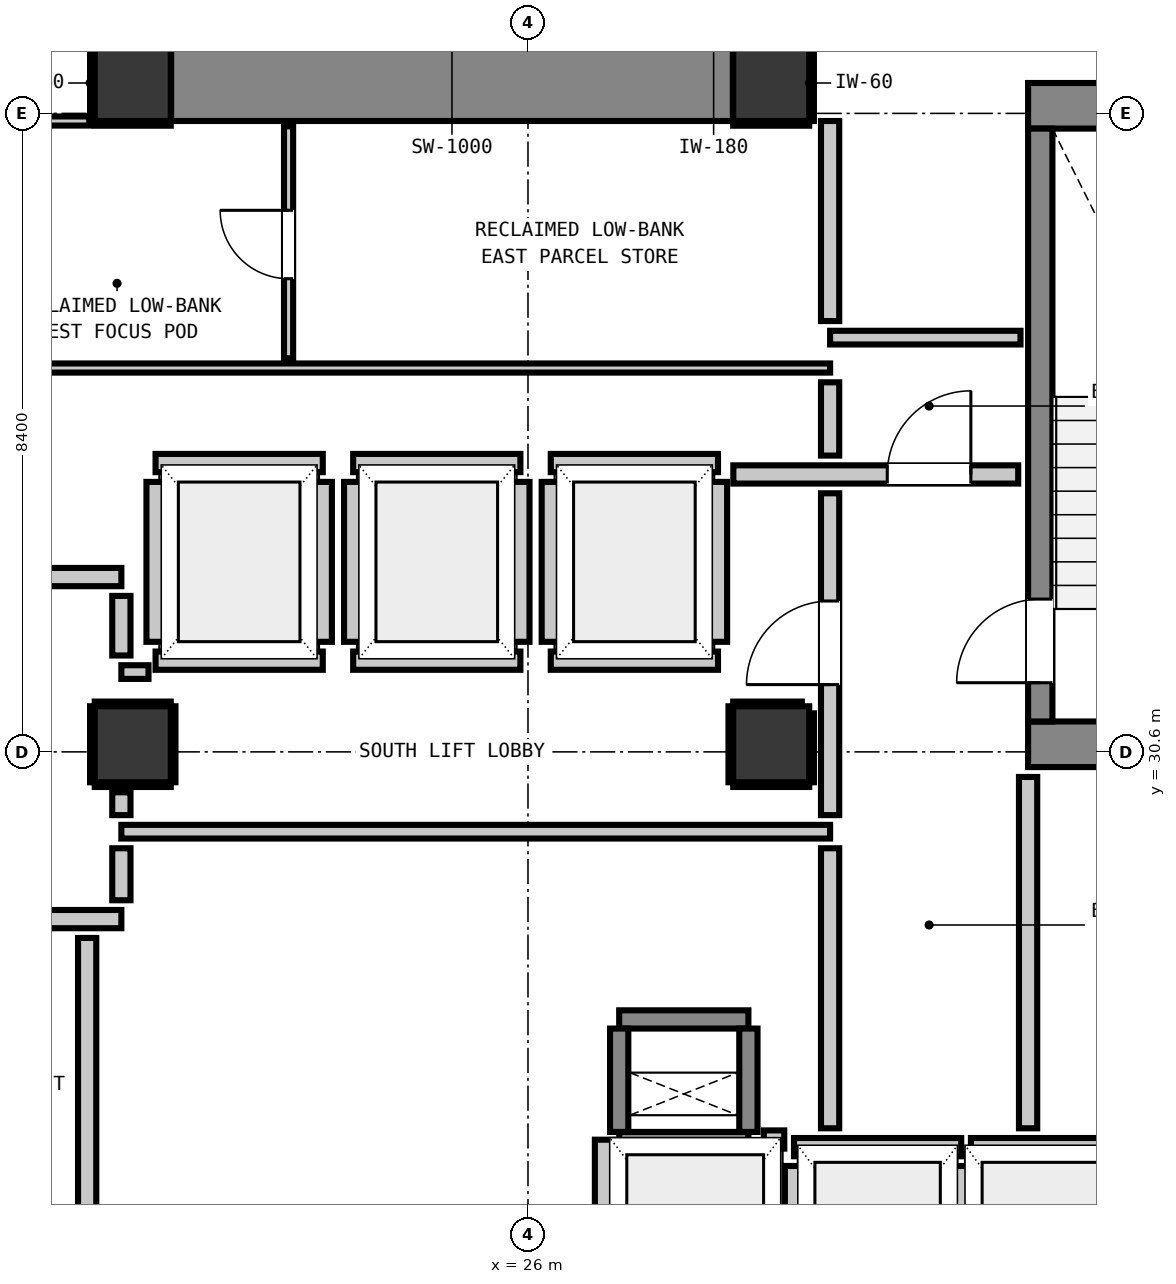
"""IFC4 building model, lengths in metres.
Left out: names, types, materials, properties, quantities, classifications, styles, units other than length and angle.
Written with IfcOpenShell. Run it as: python <this file> out.ifc"""

import sys

from ifc_helpers import new_model, si_unit, direction, frame, frame_2d, origin, origin_2d, place, context, subcontext, project, spatial, rectangle, extrude, element, fill, save


model = new_model("IFC4")
c1 = context("Model", 3, precision=1e-05, world=origin(), true_north=direction((0.0, 1.0)))
c2 = subcontext(c1, "Body", "Model", "MODEL_VIEW")
j1 = project(units=[si_unit("LENGTHUNIT", "METRE"), si_unit("PLANEANGLEUNIT", "RADIAN")], contexts=[c1])
p1 = place(None, origin())
s1 = spatial("IfcSite", under=j1, at=p1, CompositionType="ELEMENT")
p2 = place(p1, origin())
s2 = spatial("IfcBuilding", under=s1, at=p2, CompositionType="ELEMENT")
p3 = place(p2, frame((0.0, 0.0, 142.6)))
s3 = spatial("IfcBuildingStorey", under=s2, at=p3, CompositionType="ELEMENT", Elevation=142.6)
for number, where, z_axis, x_axis in (
    (1, (20.8, 39.4, 0.0), (0.0, 0.0, 1.0), (1.0, 0.0, 0.0)),
    (2, (29.2, 39.4, 0.0), (0.0, 0.0, 1.0), (1.0, 0.0, 0.0)),
):
    element("IfcColumn", number, at=place(p3, frame(where, z_axis=z_axis, x_axis=x_axis)), inside=s3, PredefinedType="COLUMN", context=c2, shape_type="SweptSolid", body=[
        extrude(rectangle(XDim=1.0, YDim=1.0, at=origin_2d()), origin(), (0.0, 0.0, 1.0), 3.32),
    ])
p4 = place(p3, frame((32.58, 39.1, 0.0), z_axis=(0.0, 0.0, 1.0), x_axis=(1.0, 0.0, 0.0)))
e3 = element("IfcWall", 3, at=p4, inside=s3, PredefinedType="SHEAR", context=c2, shape_type="SweptSolid", body=[
    extrude(rectangle(XDim=4.08, YDim=0.6, at=frame_2d((2.04, 0.0))), origin(), (0.0, 0.0, 1.0), 3.32),
])
p5 = place(p3, frame((32.58, 30.7, 0.0), z_axis=(0.0, 0.0, 1.0), x_axis=(1.0, 0.0, 0.0)))
e4 = element("IfcWall", 4, at=p5, inside=s3, PredefinedType="SHEAR", context=c2, shape_type="SweptSolid", body=[
    extrude(rectangle(XDim=3.415, YDim=0.6, at=frame_2d((1.708, 0.0))), origin(), (0.0, 0.0, 1.0), 3.32),
])
p6 = place(p3, frame((21.305, 39.4, 0.0), z_axis=(0.0, 0.0, 1.0), x_axis=(1.0, 0.0, 0.0)))
e5 = element("IfcWall", 5, at=p6, inside=s3, PredefinedType="SHEAR", context=c2, shape_type="SweptSolid", body=[
    extrude(rectangle(XDim=7.39, YDim=1.0, at=frame_2d((3.695, 0.0))), origin(), (0.0, 0.0, 1.0), 3.32),
])
p7 = place(p3, frame((32.74, 31.0, 0.0), z_axis=(0.0, 0.0, 1.0), x_axis=(0.0, 1.0, 0.0)))
e6 = element("IfcWall", 6, at=p7, inside=s3, PredefinedType="SHEAR", context=c2, shape_type="SweptSolid", body=[
    extrude(rectangle(XDim=7.8, YDim=0.32, at=frame_2d((3.9, 0.0))), origin(), (0.0, 0.0, 1.0), 3.32),
])
p8 = place(p7, frame((0.51, 0.0, 0.0)))
e7 = element("IfcOpeningElement", 7, at=p8, cuts=e6, PredefinedType="OPENING", context=c2, shape_type="SweptSolid", body=[
    extrude(rectangle(XDim=1.1, YDim=2.15, at=frame_2d((0.55, 1.075))), frame((0.0, 0.17, 0.0), z_axis=(0.0, -1.0, 0.0), x_axis=(1.0, 0.0, 0.0)), (0.0, 0.0, 1.0), 0.34),
])
for number, where, z_axis, x_axis in (
    (8, (27.2, 25.48, 0.0), (0.0, 0.0, 1.0), (1.0, 0.0, 0.0)),
    (9, (27.2, 27.08, 0.0), (0.0, 0.0, 1.0), (1.0, 0.0, 0.0)),
):
    element("IfcWall", number, at=place(p3, frame(where, z_axis=z_axis, x_axis=x_axis)), inside=s3, PredefinedType="SHEAR", context=c2, shape_type="SweptSolid", body=[
        extrude(rectangle(XDim=1.7, YDim=0.24, at=frame_2d((0.85, 0.0))), origin(), (0.0, 0.0, 1.0), 3.32),
    ])
for number, where, z_axis, x_axis in (
    (10, (27.2, 25.6, 0.0), (0.0, 0.0, 1.0), (0.0, 1.0, 0.0)),
    (11, (28.9, 25.6, 0.0), (0.0, 0.0, 1.0), (0.0, 1.0, 0.0)),
):
    element("IfcWall", number, at=place(p3, frame(where, z_axis=z_axis, x_axis=x_axis)), inside=s3, PredefinedType="SHEAR", context=c2, shape_type="SweptSolid", body=[
        extrude(rectangle(XDim=1.36, YDim=0.24, at=frame_2d((0.68, 0.0))), origin(), (0.0, 0.0, 1.0), 3.32),
    ])
for number, where, z_axis, x_axis in (
    (12, (20.8, 30.7, 0.0), (0.0, 0.0, 1.0), (1.0, 0.0, 0.0)),
    (13, (29.2, 30.7, 0.0), (0.0, 0.0, 1.0), (1.0, 0.0, 0.0)),
):
    element("IfcColumn", number, at=place(p3, frame(where, z_axis=z_axis, x_axis=x_axis)), inside=s3, PredefinedType="COLUMN", context=c2, shape_type="SweptSolid", body=[
        extrude(rectangle(XDim=1.0, YDim=1.0, at=origin_2d()), origin(), (0.0, 0.0, 1.0), 3.32),
    ])
for number, where, z_axis, x_axis in (
    (14, (21.1, 31.8, 0.0), (0.0, 0.0, 1.0), (1.0, 0.0, 0.0)),
    (15, (21.1, 34.4, 0.0), (0.0, 0.0, 1.0), (1.0, 0.0, 0.0)),
):
    element("IfcWall", number, at=place(p3, frame(where, z_axis=z_axis, x_axis=x_axis)), inside=s3, PredefinedType="PARTITIONING", context=c2, shape_type="SweptSolid", body=[
        extrude(rectangle(XDim=2.2, YDim=0.24, at=frame_2d((1.1, 0.0))), origin(), (0.0, 0.0, 1.0), 2.9),
    ])
p9 = place(p3, frame((21.1, 32.048, 0.0), z_axis=(0.0, 0.0, 1.0), x_axis=(0.0, 1.0, 0.0)))
e16 = element("IfcWall", 16, at=p9, inside=s3, PredefinedType="PARTITIONING", context=c2, shape_type="SweptSolid", body=[
    extrude(rectangle(XDim=2.104, YDim=0.24, at=frame_2d((1.052, 0.0))), origin(), (0.0, 0.0, 1.0), 0.905),
])
p10 = place(p3, frame((23.3, 32.048, 0.0), z_axis=(0.0, 0.0, 1.0), x_axis=(0.0, 1.0, 0.0)))
e17 = element("IfcWall", 17, at=p10, inside=s3, PredefinedType="PARTITIONING", context=c2, shape_type="SweptSolid", body=[
    extrude(rectangle(XDim=2.104, YDim=0.24, at=frame_2d((1.052, 0.0))), origin(), (0.0, 0.0, 1.0), 2.9),
])
for number, where, z_axis, x_axis in (
    (18, (23.7, 31.8, 0.0), (0.0, 0.0, 1.0), (1.0, 0.0, 0.0)),
    (19, (23.7, 34.4, 0.0), (0.0, 0.0, 1.0), (1.0, 0.0, 0.0)),
):
    element("IfcWall", number, at=place(p3, frame(where, z_axis=z_axis, x_axis=x_axis)), inside=s3, PredefinedType="PARTITIONING", context=c2, shape_type="SweptSolid", body=[
        extrude(rectangle(XDim=2.2, YDim=0.24, at=frame_2d((1.1, 0.0))), origin(), (0.0, 0.0, 1.0), 2.9),
    ])
for number, where, z_axis, x_axis in (
    (20, (23.7, 32.048, 0.0), (0.0, 0.0, 1.0), (0.0, 1.0, 0.0)),
    (21, (25.9, 32.048, 0.0), (0.0, 0.0, 1.0), (0.0, 1.0, 0.0)),
):
    element("IfcWall", number, at=place(p3, frame(where, z_axis=z_axis, x_axis=x_axis)), inside=s3, PredefinedType="PARTITIONING", context=c2, shape_type="SweptSolid", body=[
        extrude(rectangle(XDim=2.104, YDim=0.24, at=frame_2d((1.052, 0.0))), origin(), (0.0, 0.0, 1.0), 2.9),
    ])
for number, where, z_axis, x_axis in (
    (22, (26.3, 31.8, 0.0), (0.0, 0.0, 1.0), (1.0, 0.0, 0.0)),
    (23, (26.3, 34.4, 0.0), (0.0, 0.0, 1.0), (1.0, 0.0, 0.0)),
):
    element("IfcWall", number, at=place(p3, frame(where, z_axis=z_axis, x_axis=x_axis)), inside=s3, PredefinedType="PARTITIONING", context=c2, shape_type="SweptSolid", body=[
        extrude(rectangle(XDim=2.2, YDim=0.24, at=frame_2d((1.1, 0.0))), origin(), (0.0, 0.0, 1.0), 2.9),
    ])
p11 = place(p3, frame((26.3, 32.048, 0.0), z_axis=(0.0, 0.0, 1.0), x_axis=(0.0, 1.0, 0.0)))
e24 = element("IfcWall", 24, at=p11, inside=s3, PredefinedType="PARTITIONING", context=c2, shape_type="SweptSolid", body=[
    extrude(rectangle(XDim=2.104, YDim=0.24, at=frame_2d((1.052, 0.0))), origin(), (0.0, 0.0, 1.0), 2.9),
])
p12 = place(p3, frame((28.5, 32.048, 0.0), z_axis=(0.0, 0.0, 1.0), x_axis=(0.0, 1.0, 0.0)))
e25 = element("IfcWall", 25, at=p12, inside=s3, PredefinedType="PARTITIONING", context=c2, shape_type="SweptSolid", body=[
    extrude(rectangle(XDim=2.104, YDim=0.24, at=frame_2d((1.052, 0.0))), origin(), (0.0, 0.0, 1.0), 0.905),
])
p13 = place(p3, frame((29.5, 25.4, 0.0), z_axis=(0.0, 0.0, 1.0), x_axis=(1.0, 0.0, 0.0)))
e26 = element("IfcWall", 26, at=p13, inside=s3, PredefinedType="PARTITIONING", context=c2, shape_type="SweptSolid", body=[
    extrude(rectangle(XDim=2.2, YDim=0.24, at=frame_2d((1.1, 0.0))), origin(), (0.0, 0.0, 1.0), 2.9),
])
p14 = place(p3, frame((29.5, 22.632, 0.0), z_axis=(0.0, 0.0, 1.0), x_axis=(0.0, 1.0, 0.0)))
e27 = element("IfcWall", 27, at=p14, inside=s3, PredefinedType="PARTITIONING", context=c2, shape_type="SweptSolid", body=[
    extrude(rectangle(XDim=2.52, YDim=0.24, at=frame_2d((1.26, 0.0))), origin(), (0.0, 0.0, 1.0), 0.905),
])
p15 = place(p3, frame((31.7, 22.63, 0.0), z_axis=(0.0, 0.0, 1.0), x_axis=(0.0, 1.0, 0.0)))
e28 = element("IfcWall", 28, at=p15, inside=s3, PredefinedType="PARTITIONING", context=c2, shape_type="SweptSolid", body=[
    extrude(rectangle(XDim=2.522, YDim=0.24, at=frame_2d((1.261, 0.0))), origin(), (0.0, 0.0, 1.0), 2.9),
])
p16 = place(p3, frame((31.828, 25.4, 0.0), z_axis=(0.0, 0.0, 1.0), x_axis=(1.0, 0.0, 0.0)))
e29 = element("IfcWall", 29, at=p16, inside=s3, PredefinedType="PARTITIONING", context=c2, shape_type="SweptSolid", body=[
    extrude(rectangle(XDim=2.072, YDim=0.24, at=frame_2d((1.036, 0.0))), origin(), (0.0, 0.0, 1.0), 2.9),
])
p17 = place(p3, frame((29.103, 25.5, 0.0), z_axis=(0.0, 0.0, 1.0), x_axis=(1.0, 0.0, 0.0)))
e30 = element("IfcWall", 30, at=p17, inside=s3, PredefinedType="PARTITIONING", context=c2, shape_type="SweptSolid", body=[
    extrude(rectangle(XDim=0.269, YDim=0.24, at=frame_2d((0.135, 0.0))), origin(), (0.0, 0.0, 1.0), 2.9),
])
p18 = place(p3, frame((27.0, 22.63, 0.0), z_axis=(0.0, 0.0, 1.0), x_axis=(0.0, 1.0, 0.0)))
e31 = element("IfcWall", 31, at=p18, inside=s3, PredefinedType="PARTITIONING", context=c2, shape_type="SweptSolid", body=[
    extrude(rectangle(XDim=2.868, YDim=0.24, at=frame_2d((1.434, 0.0))), origin(), (0.0, 0.0, 1.0), 2.9),
])
p19 = place(p3, frame((17.45, 28.4, 0.0), z_axis=(0.0, 0.0, 1.0), x_axis=(1.0, 0.0, 0.0)))
e32 = element("IfcWall", 32, at=p19, inside=s3, PredefinedType="PARTITIONING", context=c2, shape_type="SweptSolid", body=[
    extrude(rectangle(XDim=3.2, YDim=0.24, at=frame_2d((1.6, 0.0))), origin(), (0.0, 0.0, 1.0), 2.9),
])
p20 = place(p19, frame((0.784, 0.0, 0.0)))
e33 = element("IfcOpeningElement", 33, at=p20, cuts=e32, PredefinedType="OPENING", context=c2, shape_type="SweptSolid", body=[
    extrude(rectangle(XDim=1.1, YDim=2.15, at=frame_2d((0.55, 1.075))), frame((0.0, 0.13, 0.0), z_axis=(0.0, -1.0, 0.0), x_axis=(1.0, 0.0, 0.0)), (0.0, 0.0, 1.0), 0.26),
])
p21 = place(p3, frame((17.45, 32.9, 0.0), z_axis=(0.0, 0.0, 1.0), x_axis=(1.0, 0.0, 0.0)))
e34 = element("IfcWall", 34, at=p21, inside=s3, PredefinedType="PARTITIONING", context=c2, shape_type="SweptSolid", body=[
    extrude(rectangle(XDim=3.2, YDim=0.24, at=frame_2d((1.6, 0.0))), origin(), (0.0, 0.0, 1.0), 2.9),
])
p22 = place(p21, frame((0.159, 0.0, 0.0)))
e35 = element("IfcOpeningElement", 35, at=p22, cuts=e34, PredefinedType="OPENING", context=c2, shape_type="SweptSolid", body=[
    extrude(rectangle(XDim=1.1, YDim=2.15, at=frame_2d((0.55, 1.075))), frame((0.0, 0.13, 0.0), z_axis=(0.0, -1.0, 0.0), x_axis=(1.0, 0.0, 0.0)), (0.0, 0.0, 1.0), 0.26),
])
p23 = place(p3, frame((28.702, 34.25, 0.0), z_axis=(0.0, 0.0, 1.0), x_axis=(1.0, 0.0, 0.0)))
e36 = element("IfcWall", 36, at=p23, inside=s3, PredefinedType="PARTITIONING", context=c2, shape_type="SweptSolid", body=[
    extrude(rectangle(XDim=3.748, YDim=0.24, at=frame_2d((1.874, 0.0))), origin(), (0.0, 0.0, 1.0), 2.9),
])
p24 = place(p23, frame((2.025, 0.0, 0.0)))
e37 = element("IfcOpeningElement", 37, at=p24, cuts=e36, PredefinedType="OPENING", context=c2, shape_type="SweptSolid", body=[
    extrude(rectangle(XDim=1.1, YDim=2.15, at=frame_2d((0.55, 1.075))), frame((0.0, 0.13, 0.0), z_axis=(0.0, -1.0, 0.0), x_axis=(1.0, 0.0, 0.0)), (0.0, 0.0, 1.0), 0.26),
])
p25 = place(p3, frame((20.65, 29.55, 0.0), z_axis=(0.0, 0.0, 1.0), x_axis=(1.0, 0.0, 0.0)))
e38 = element("IfcWall", 38, at=p25, inside=s3, PredefinedType="PARTITIONING", context=c2, shape_type="SweptSolid", body=[
    extrude(rectangle(XDim=9.325, YDim=0.18, at=frame_2d((4.663, 0.0))), origin(), (0.0, 0.0, 1.0), 2.9),
])
p26 = place(p3, frame((20.65, 31.65, 0.0), z_axis=(0.0, 0.0, 1.0), x_axis=(1.0, 0.0, 0.0)))
e39 = element("IfcWall", 39, at=p26, inside=s3, PredefinedType="PARTITIONING", context=c2, shape_type="SweptSolid", body=[
    extrude(rectangle(XDim=0.357, YDim=0.18, at=frame_2d((0.179, 0.0))), origin(), (0.0, 0.0, 1.0), 2.9),
])
p27 = place(p3, frame((29.975, 36.05, 0.0), z_axis=(0.0, 0.0, 1.0), x_axis=(1.0, 0.0, 0.0)))
e40 = element("IfcWall", 40, at=p27, inside=s3, PredefinedType="PARTITIONING", context=c2, shape_type="SweptSolid", body=[
    extrude(rectangle(XDim=2.505, YDim=0.18, at=frame_2d((1.252, 0.0))), origin(), (0.0, 0.0, 1.0), 2.9),
])
p28 = place(p3, frame((18.95, 35.65, 0.0), z_axis=(0.0, 0.0, 1.0), x_axis=(1.0, 0.0, 0.0)))
e41 = element("IfcWall", 41, at=p28, inside=s3, PredefinedType="PARTITIONING", context=c2, shape_type="SweptSolid", body=[
    extrude(rectangle(XDim=11.025, YDim=0.12, at=frame_2d((5.513, 0.0))), origin(), (0.0, 0.0, 1.0), 2.9),
])
p29 = place(p3, frame((18.95, 38.9, 0.0), z_axis=(0.0, 0.0, 1.0), x_axis=(1.0, 0.0, 0.0)))
e42 = element("IfcWall", 42, at=p29, inside=s3, PredefinedType="PARTITIONING", context=c2, shape_type="SweptSolid", body=[
    extrude(rectangle(XDim=1.278, YDim=0.12, at=frame_2d((0.639, 0.0))), origin(), (0.0, 0.0, 1.0), 0.905),
])
p30 = place(p3, frame((20.2, 22.586, 0.0), z_axis=(0.0, 0.0, 1.0), x_axis=(0.0, 1.0, 0.0)))
e43 = element("IfcWall", 43, at=p30, inside=s3, PredefinedType="PARTITIONING", context=c2, shape_type="SweptSolid", body=[
    extrude(rectangle(XDim=5.566, YDim=0.24, at=frame_2d((2.783, 0.0))), origin(), (0.0, 0.0, 1.0), 0.905),
])
p31 = place(p3, frame((20.65, 28.648, 0.0), z_axis=(0.0, 0.0, 1.0), x_axis=(0.0, 1.0, 0.0)))
e44 = element("IfcWall", 44, at=p31, inside=s3, PredefinedType="PARTITIONING", context=c2, shape_type="SweptSolid", body=[
    extrude(rectangle(XDim=0.684, YDim=0.24, at=frame_2d((0.342, 0.0))), origin(), (0.0, 0.0, 1.0), 0.905),
])
p32 = place(p3, frame((20.65, 29.768, 0.0), z_axis=(0.0, 0.0, 1.0), x_axis=(0.0, 1.0, 0.0)))
e45 = element("IfcWall", 45, at=p32, inside=s3, PredefinedType="PARTITIONING", context=c2, shape_type="SweptSolid", body=[
    extrude(rectangle(XDim=0.3, YDim=0.24, at=frame_2d((0.15, 0.0))), origin(), (0.0, 0.0, 1.0), 0.905),
])
p33 = place(p3, frame((20.65, 31.868, 0.0), z_axis=(0.0, 0.0, 1.0), x_axis=(0.0, 1.0, 0.0)))
e46 = element("IfcWall", 46, at=p33, inside=s3, PredefinedType="PARTITIONING", context=c2, shape_type="SweptSolid", body=[
    extrude(rectangle(XDim=0.784, YDim=0.24, at=frame_2d((0.392, 0.0))), origin(), (0.0, 0.0, 1.0), 0.905),
])
p34 = place(p3, frame((29.975, 25.648, 0.0), z_axis=(0.0, 0.0, 1.0), x_axis=(0.0, 1.0, 0.0)))
e47 = element("IfcWall", 47, at=p34, inside=s3, PredefinedType="PARTITIONING", context=c2, shape_type="SweptSolid", body=[
    extrude(rectangle(XDim=3.684, YDim=0.24, at=frame_2d((1.842, 0.0))), origin(), (0.0, 0.0, 1.0), 2.9),
])
p35 = place(p3, frame((29.975, 29.768, 0.0), z_axis=(0.0, 0.0, 1.0), x_axis=(0.0, 1.0, 0.0)))
e48 = element("IfcWall", 48, at=p35, inside=s3, PredefinedType="PARTITIONING", context=c2, shape_type="SweptSolid", body=[
    extrude(rectangle(XDim=4.234, YDim=0.24, at=frame_2d((2.117, 0.0))), origin(), (0.0, 0.0, 1.0), 2.9),
])
p36 = place(p35, frame((1.717, 0.0, 0.0)))
e49 = element("IfcOpeningElement", 49, at=p36, cuts=e48, PredefinedType="OPENING", context=c2, shape_type="SweptSolid", body=[
    extrude(rectangle(XDim=1.1, YDim=2.15, at=frame_2d((0.55, 1.075))), frame((0.0, 0.13, 0.0), z_axis=(0.0, -1.0, 0.0), x_axis=(1.0, 0.0, 0.0)), (0.0, 0.0, 1.0), 0.26),
])
p37 = place(p3, frame((29.975, 34.498, 0.0), z_axis=(0.0, 0.0, 1.0), x_axis=(0.0, 1.0, 0.0)))
e50 = element("IfcWall", 50, at=p37, inside=s3, PredefinedType="PARTITIONING", context=c2, shape_type="SweptSolid", body=[
    extrude(rectangle(XDim=0.964, YDim=0.24, at=frame_2d((0.482, 0.0))), origin(), (0.0, 0.0, 1.0), 2.9),
])
p38 = place(p3, frame((29.975, 36.268, 0.0), z_axis=(0.0, 0.0, 1.0), x_axis=(0.0, 1.0, 0.0)))
e51 = element("IfcWall", 51, at=p38, inside=s3, PredefinedType="PARTITIONING", context=c2, shape_type="SweptSolid", body=[
    extrude(rectangle(XDim=2.632, YDim=0.24, at=frame_2d((1.316, 0.0))), origin(), (0.0, 0.0, 1.0), 2.9),
])
p39 = place(p3, frame((32.58, 25.648, 0.0), z_axis=(0.0, 0.0, 1.0), x_axis=(0.0, 1.0, 0.0)))
e52 = element("IfcWall", 52, at=p39, inside=s3, PredefinedType="PARTITIONING", context=c2, shape_type="SweptSolid", body=[
    extrude(rectangle(XDim=4.622, YDim=0.24, at=frame_2d((2.311, 0.0))), origin(), (0.0, 0.0, 1.0), 2.9),
])
p40 = place(p3, frame((22.85, 35.778, 0.0), z_axis=(0.0, 0.0, 1.0), x_axis=(0.0, 1.0, 0.0)))
e53 = element("IfcWall", 53, at=p40, inside=s3, PredefinedType="PARTITIONING", context=c2, shape_type="SweptSolid", body=[
    extrude(rectangle(XDim=3.052, YDim=0.12, at=frame_2d((1.526, 0.0))), origin(), (0.0, 0.0, 1.0), 2.9),
])
p41 = place(p40, frame((1.047, 0.0, 0.0)))
e54 = element("IfcOpeningElement", 54, at=p41, cuts=e53, PredefinedType="OPENING", context=c2, shape_type="SweptSolid", body=[
    extrude(rectangle(XDim=0.9, YDim=2.1, at=frame_2d((0.45, 1.05))), frame((0.0, 0.07, 0.0), z_axis=(0.0, -1.0, 0.0), x_axis=(1.0, 0.0, 0.0)), (0.0, 0.0, 1.0), 0.14),
])
for number, where, z_axis, x_axis in (
    (55, (20.3, 38.868, 0.0), (0.0, 0.0, 1.0), (1.0, 0.0, 0.0)),
    (56, (20.268, 38.9, 0.0), (0.0, 0.0, 1.0), (0.0, 1.0, 0.0)),
    (57, (28.7, 38.868, 0.0), (0.0, 0.0, 1.0), (1.0, 0.0, 0.0)),
    (58, (29.732, 38.9, 0.0), (0.0, 0.0, 1.0), (0.0, 1.0, 0.0)),
    (59, (20.3, 30.168, 0.0), (0.0, 0.0, 1.0), (1.0, 0.0, 0.0)),
    (60, (20.3, 31.232, 0.0), (0.0, 0.0, 1.0), (1.0, 0.0, 0.0)),
    (61, (20.268, 30.2, 0.0), (0.0, 0.0, 1.0), (0.0, 1.0, 0.0)),
    (62, (21.332, 30.2, 0.0), (0.0, 0.0, 1.0), (0.0, 1.0, 0.0)),
    (63, (28.7, 30.168, 0.0), (0.0, 0.0, 1.0), (1.0, 0.0, 0.0)),
):
    element("IfcWall", number, at=place(p3, frame(where, z_axis=z_axis, x_axis=x_axis)), inside=s3, PredefinedType="PARTITIONING", context=c2, shape_type="SweptSolid", body=[
        extrude(rectangle(XDim=1.0, YDim=0.06, at=frame_2d((0.5, 0.0))), origin(), (0.0, 0.0, 1.0), 0.905),
    ])
p42 = place(p3, frame((28.7, 31.232, 0.0), z_axis=(0.0, 0.0, 1.0), x_axis=(1.0, 0.0, 0.0)))
e64 = element("IfcWall", 64, at=p42, inside=s3, PredefinedType="PARTITIONING", context=c2, shape_type="SweptSolid", body=[
    extrude(rectangle(XDim=0.903, YDim=0.06, at=frame_2d((0.452, 0.0))), origin(), (0.0, 0.0, 1.0), 0.905),
])
p43 = place(p3, frame((28.668, 30.2, 0.0), z_axis=(0.0, 0.0, 1.0), x_axis=(0.0, 1.0, 0.0)))
e65 = element("IfcWall", 65, at=p43, inside=s3, PredefinedType="PARTITIONING", context=c2, shape_type="SweptSolid", body=[
    extrude(rectangle(XDim=1.0, YDim=0.06, at=frame_2d((0.5, 0.0))), origin(), (0.0, 0.0, 1.0), 0.905),
])
p44 = place(p3, frame((29.732, 30.2, 0.0), z_axis=(0.0, 0.0, 1.0), x_axis=(0.0, 1.0, 0.0)))
e66 = element("IfcWall", 66, at=p44, inside=s3, PredefinedType="PARTITIONING", context=c2, shape_type="SweptSolid", body=[
    extrude(rectangle(XDim=0.907, YDim=0.06, at=frame_2d((0.454, 0.0))), origin(), (0.0, 0.0, 1.0), 0.905),
])
p45 = place(p8, origin())
e67 = element("IfcDoor", 67, at=p45, inside=s3, OperationType="SINGLE_SWING_LEFT", PredefinedType="DOOR", context=c2, shape_type="SweptSolid", body=[
    extrude(rectangle(XDim=1.1, YDim=2.15, at=frame_2d((0.55, 1.075))), frame((0.0, 0.025, 0.0), z_axis=(0.0, -1.0, 0.0), x_axis=(1.0, 0.0, 0.0)), (0.0, 0.0, 1.0), 0.05),
])
fill(e7, e67)
p46 = place(p36, origin())
e68 = element("IfcDoor", 68, at=p46, inside=s3, OperationType="SINGLE_SWING_LEFT", PredefinedType="DOOR", context=c2, shape_type="SweptSolid", body=[
    extrude(rectangle(XDim=1.1, YDim=2.15, at=frame_2d((0.55, 1.075))), frame((0.0, 0.025, 0.0), z_axis=(0.0, -1.0, 0.0), x_axis=(1.0, 0.0, 0.0)), (0.0, 0.0, 1.0), 0.05),
])
fill(e49, e68)
p47 = place(p24, origin())
e69 = element("IfcDoor", 69, at=p47, inside=s3, OperationType="SINGLE_SWING_RIGHT", PredefinedType="DOOR", context=c2, shape_type="SweptSolid", body=[
    extrude(rectangle(XDim=1.1, YDim=2.15, at=frame_2d((0.55, 1.075))), frame((0.0, 0.025, 0.0), z_axis=(0.0, -1.0, 0.0), x_axis=(1.0, 0.0, 0.0)), (0.0, 0.0, 1.0), 0.05),
])
fill(e37, e69)
p48 = place(p41, origin())
e70 = element("IfcDoor", 70, at=p48, inside=s3, OperationType="SINGLE_SWING_RIGHT", PredefinedType="DOOR", context=c2, shape_type="SweptSolid", body=[
    extrude(rectangle(XDim=0.9, YDim=2.1, at=frame_2d((0.45, 1.05))), frame((0.0, 0.025, 0.0), z_axis=(0.0, -1.0, 0.0), x_axis=(1.0, 0.0, 0.0)), (0.0, 0.0, 1.0), 0.05),
])
fill(e54, e70)
save(model, sys.argv[1])
